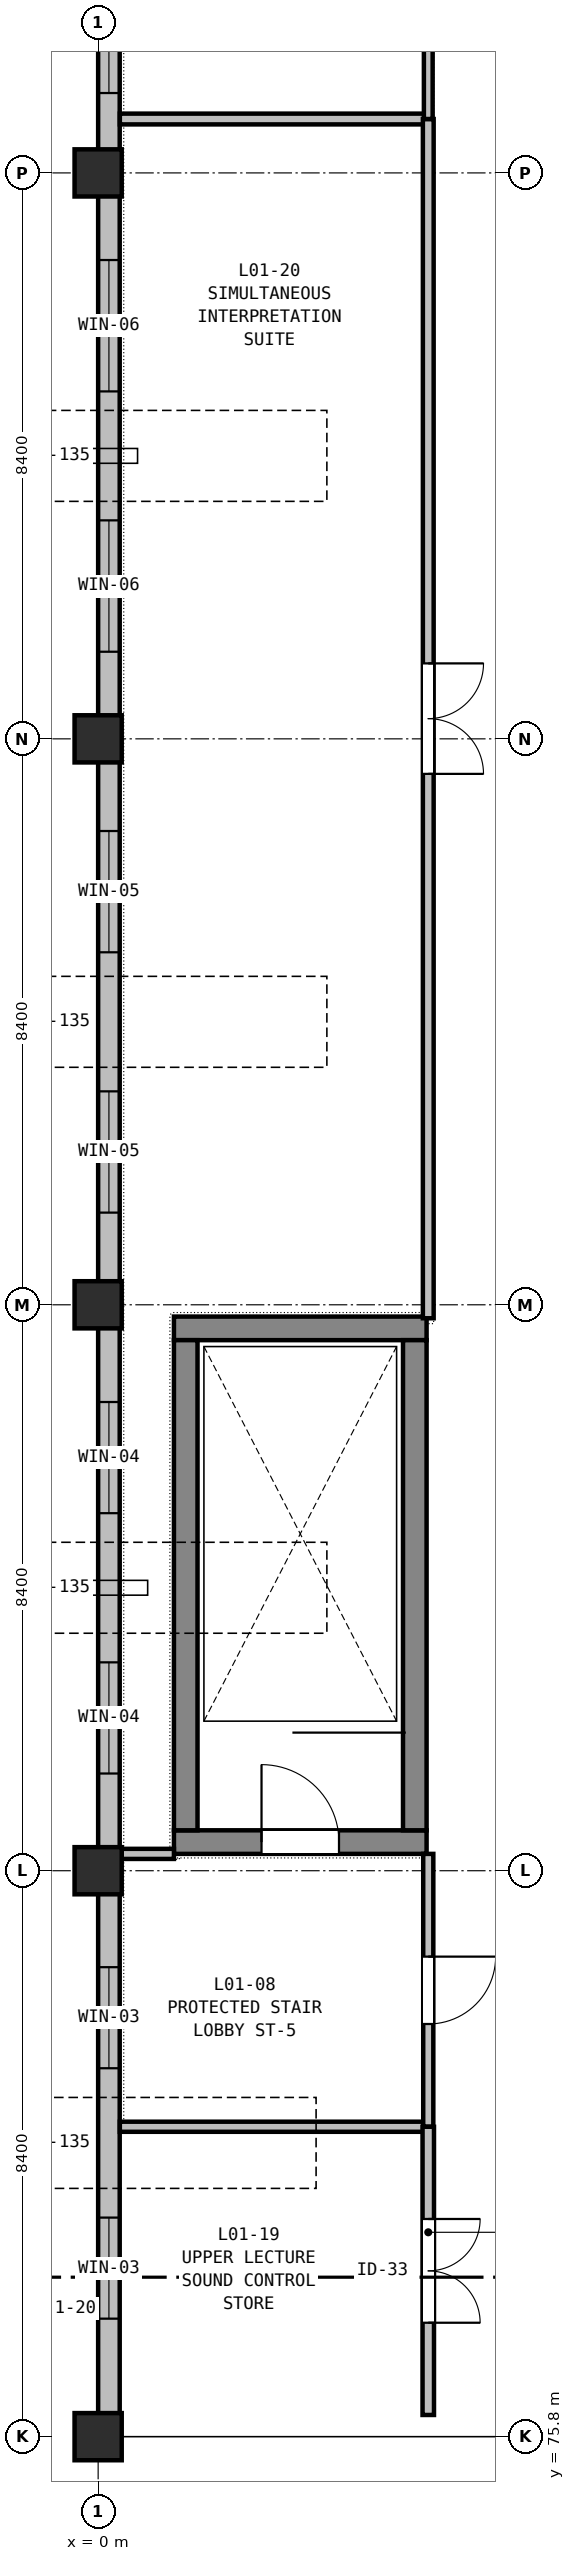
"""IFC4 building model, lengths in metres.
Left out: names, types, materials, properties, quantities, classifications, styles, units other than length and angle.
Written with IfcOpenShell. Run it as: python <this file> out.ifc"""

import sys

from ifc_helpers import new_model, si_unit, direction, frame, frame_2d, origin, origin_2d, place, context, subcontext, project, spatial, rectangle, extrude, element, fill, save


model = new_model("IFC4")
c1 = context("Model", 3, precision=1e-05, world=origin(), true_north=direction((0.0, 1.0)))
c2 = subcontext(c1, "Body", "Model", "MODEL_VIEW")
j1 = project(units=[si_unit("LENGTHUNIT", "METRE"), si_unit("PLANEANGLEUNIT", "RADIAN")], contexts=[c1])
p1 = place(None, origin())
s1 = spatial("IfcSite", under=j1, at=p1, CompositionType="ELEMENT")
p2 = place(p1, origin())
s2 = spatial("IfcBuilding", under=s1, at=p2, CompositionType="ELEMENT")
p3 = place(p2, frame((0.0, 0.0, 5.4)))
s3 = spatial("IfcBuildingStorey", under=s2, at=p3, CompositionType="ELEMENT", Elevation=5.4)
for number, where, z_axis, x_axis in (
    (1, (0.0, 75.8, 0.0), (0.0, 0.0, 1.0), (1.0, 0.0, 0.0)),
    (2, (0.0, 84.2, 0.0), (0.0, 0.0, 1.0), (1.0, 0.0, 0.0)),
    (3, (0.0, 92.6, 0.0), (0.0, 0.0, 1.0), (1.0, 0.0, 0.0)),
    (4, (0.0, 101.0, 0.0), (0.0, 0.0, 1.0), (1.0, 0.0, 0.0)),
    (5, (0.0, 109.4, 0.0), (0.0, 0.0, 1.0), (1.0, 0.0, 0.0)),
):
    element("IfcColumn", number, at=place(p3, frame(where, z_axis=z_axis, x_axis=x_axis)), inside=s3, PredefinedType="COLUMN", context=c2, shape_type="SweptSolid", body=[
        extrude(rectangle(XDim=0.7, YDim=0.7, at=origin_2d()), origin(), (0.0, 0.0, 1.0), 4.74),
    ])
p4 = place(p3, frame((1.125, 84.625, 0.0), z_axis=(0.0, 0.0, 1.0), x_axis=(1.0, 0.0, 0.0)))
e6 = element("IfcWall", 6, at=p4, inside=s3, PredefinedType="SHEAR", context=c2, shape_type="SweptSolid", body=[
    extrude(rectangle(XDim=3.75, YDim=0.35, at=frame_2d((1.875, 0.0))), origin(), (0.0, 0.0, 1.0), 4.74),
])
p5 = place(p4, frame((1.3, 0.0, 0.0)))
e7 = element("IfcOpeningElement", 7, at=p5, cuts=e6, PredefinedType="OPENING", context=c2, shape_type="SweptSolid", body=[
    extrude(rectangle(XDim=1.15, YDim=2.15, at=frame_2d((0.575, 1.075))), frame((0.0, 0.185, 0.0), z_axis=(0.0, -1.0, 0.0), x_axis=(1.0, 0.0, 0.0)), (0.0, 0.0, 1.0), 0.37),
])
p6 = place(p3, frame((1.125, 92.25, 0.0), z_axis=(0.0, 0.0, 1.0), x_axis=(1.0, 0.0, 0.0)))
e8 = element("IfcWall", 8, at=p6, inside=s3, PredefinedType="SHEAR", context=c2, shape_type="SweptSolid", body=[
    extrude(rectangle(XDim=3.75, YDim=0.35, at=frame_2d((1.875, 0.0))), origin(), (0.0, 0.0, 1.0), 4.74),
])
for number, where, z_axis, x_axis in (
    (9, (1.3, 84.8, 0.0), (0.0, 0.0, 1.0), (0.0, 1.0, 0.0)),
    (10, (4.7, 84.8, 0.0), (0.0, 0.0, 1.0), (0.0, 1.0, 0.0)),
):
    element("IfcWall", number, at=place(p3, frame(where, z_axis=z_axis, x_axis=x_axis)), inside=s3, PredefinedType="SHEAR", context=c2, shape_type="SweptSolid", body=[
        extrude(rectangle(XDim=7.275, YDim=0.35, at=frame_2d((3.637, 0.0))), origin(), (0.0, 0.0, 1.0), 4.74),
    ])
p7 = place(p3, frame((0.16, 76.12, 0.0), z_axis=(0.0, 0.0, 1.0), x_axis=(0.0, 1.0, 0.0)))
e11 = element("IfcWall", 11, at=p7, inside=s3, PredefinedType="STANDARD", context=c2, shape_type="SweptSolid", body=[
    extrude(rectangle(XDim=8.08, YDim=0.32, at=frame_2d((4.04, 0.0))), origin(), (0.0, 0.0, 1.0), 4.085),
])
p8 = place(p7, frame((1.432, 0.0, 0.9)))
e12 = element("IfcOpeningElement", 12, at=p8, cuts=e11, PredefinedType="OPENING", context=c2, shape_type="SweptSolid", body=[
    extrude(rectangle(XDim=1.5, YDim=2.1, at=frame_2d((0.75, 1.05))), frame((0.0, 0.17, 0.0), z_axis=(0.0, -1.0, 0.0), x_axis=(1.0, 0.0, 0.0)), (0.0, 0.0, 1.0), 0.34),
])
p9 = place(p7, frame((5.148, 0.0, 0.9)))
e13 = element("IfcOpeningElement", 13, at=p9, cuts=e11, PredefinedType="OPENING", context=c2, shape_type="SweptSolid", body=[
    extrude(rectangle(XDim=1.5, YDim=2.1, at=frame_2d((0.75, 1.05))), frame((0.0, 0.17, 0.0), z_axis=(0.0, -1.0, 0.0), x_axis=(1.0, 0.0, 0.0)), (0.0, 0.0, 1.0), 0.34),
])
p10 = place(p3, frame((0.16, 84.2, 0.0), z_axis=(0.0, 0.0, 1.0), x_axis=(0.0, 1.0, 0.0)))
e14 = element("IfcWall", 14, at=p10, inside=s3, PredefinedType="STANDARD", context=c2, shape_type="SweptSolid", body=[
    extrude(rectangle(XDim=8.4, YDim=0.32, at=frame_2d((4.2, 0.0))), origin(), (0.0, 0.0, 1.0), 4.085),
])
p11 = place(p10, frame((1.443, 0.0, 0.9)))
e15 = element("IfcOpeningElement", 15, at=p11, cuts=e14, PredefinedType="OPENING", context=c2, shape_type="SweptSolid", body=[
    extrude(rectangle(XDim=1.65, YDim=2.1, at=frame_2d((0.825, 1.05))), frame((0.0, 0.17, 0.0), z_axis=(0.0, -1.0, 0.0), x_axis=(1.0, 0.0, 0.0)), (0.0, 0.0, 1.0), 0.34),
])
p12 = place(p10, frame((5.307, 0.0, 0.9)))
e16 = element("IfcOpeningElement", 16, at=p12, cuts=e14, PredefinedType="OPENING", context=c2, shape_type="SweptSolid", body=[
    extrude(rectangle(XDim=1.65, YDim=2.1, at=frame_2d((0.825, 1.05))), frame((0.0, 0.17, 0.0), z_axis=(0.0, -1.0, 0.0), x_axis=(1.0, 0.0, 0.0)), (0.0, 0.0, 1.0), 0.34),
])
p13 = place(p3, frame((0.16, 92.6, 0.0), z_axis=(0.0, 0.0, 1.0), x_axis=(0.0, 1.0, 0.0)))
e17 = element("IfcWall", 17, at=p13, inside=s3, PredefinedType="STANDARD", context=c2, shape_type="SweptSolid", body=[
    extrude(rectangle(XDim=8.4, YDim=0.32, at=frame_2d((4.2, 0.0))), origin(), (0.0, 0.0, 1.0), 4.085),
])
p14 = place(p13, frame((1.368, 0.0, 0.9)))
e18 = element("IfcOpeningElement", 18, at=p14, cuts=e17, PredefinedType="OPENING", context=c2, shape_type="SweptSolid", body=[
    extrude(rectangle(XDim=1.8, YDim=2.1, at=frame_2d((0.9, 1.05))), frame((0.0, 0.17, 0.0), z_axis=(0.0, -1.0, 0.0), x_axis=(1.0, 0.0, 0.0)), (0.0, 0.0, 1.0), 0.34),
])
p15 = place(p13, frame((5.232, 0.0, 0.9)))
e19 = element("IfcOpeningElement", 19, at=p15, cuts=e17, PredefinedType="OPENING", context=c2, shape_type="SweptSolid", body=[
    extrude(rectangle(XDim=1.8, YDim=2.1, at=frame_2d((0.9, 1.05))), frame((0.0, 0.17, 0.0), z_axis=(0.0, -1.0, 0.0), x_axis=(1.0, 0.0, 0.0)), (0.0, 0.0, 1.0), 0.34),
])
p16 = place(p3, frame((0.16, 101.0, 0.0), z_axis=(0.0, 0.0, 1.0), x_axis=(0.0, 1.0, 0.0)))
e20 = element("IfcWall", 20, at=p16, inside=s3, PredefinedType="STANDARD", context=c2, shape_type="SweptSolid", body=[
    extrude(rectangle(XDim=8.4, YDim=0.32, at=frame_2d((4.2, 0.0))), origin(), (0.0, 0.0, 1.0), 4.085),
])
p17 = place(p16, frame((1.293, 0.0, 0.9)))
e21 = element("IfcOpeningElement", 21, at=p17, cuts=e20, PredefinedType="OPENING", context=c2, shape_type="SweptSolid", body=[
    extrude(rectangle(XDim=1.95, YDim=2.1, at=frame_2d((0.975, 1.05))), frame((0.0, 0.17, 0.0), z_axis=(0.0, -1.0, 0.0), x_axis=(1.0, 0.0, 0.0)), (0.0, 0.0, 1.0), 0.34),
])
p18 = place(p16, frame((5.157, 0.0, 0.9)))
e22 = element("IfcOpeningElement", 22, at=p18, cuts=e20, PredefinedType="OPENING", context=c2, shape_type="SweptSolid", body=[
    extrude(rectangle(XDim=1.95, YDim=2.1, at=frame_2d((0.975, 1.05))), frame((0.0, 0.17, 0.0), z_axis=(0.0, -1.0, 0.0), x_axis=(1.0, 0.0, 0.0)), (0.0, 0.0, 1.0), 0.34),
])
p19 = place(p3, frame((0.16, 109.4, 0.0), z_axis=(0.0, 0.0, 1.0), x_axis=(0.0, 1.0, 0.0)))
e23 = element("IfcWall", 23, at=p19, inside=s3, PredefinedType="STANDARD", context=c2, shape_type="SweptSolid", body=[
    extrude(rectangle(XDim=8.28, YDim=0.32, at=frame_2d((4.14, 0.0))), origin(), (0.0, 0.0, 1.0), 4.085),
])
p20 = place(p19, frame((1.186, 0.0, 0.9)))
e24 = element("IfcOpeningElement", 24, at=p20, cuts=e23, PredefinedType="OPENING", context=c2, shape_type="SweptSolid", body=[
    extrude(rectangle(XDim=2.1, YDim=2.1, at=frame_2d((1.05, 1.05))), frame((0.0, 0.17, 0.0), z_axis=(0.0, -1.0, 0.0), x_axis=(1.0, 0.0, 0.0)), (0.0, 0.0, 1.0), 0.34),
])
p21 = place(p19, frame((4.994, 0.0, 0.9)))
e25 = element("IfcOpeningElement", 25, at=p21, cuts=e23, PredefinedType="OPENING", context=c2, shape_type="SweptSolid", body=[
    extrude(rectangle(XDim=2.1, YDim=2.1, at=frame_2d((1.05, 1.05))), frame((0.0, 0.17, 0.0), z_axis=(0.0, -1.0, 0.0), x_axis=(1.0, 0.0, 0.0)), (0.0, 0.0, 1.0), 0.34),
])
p22 = place(p3, frame((6.8, 75.96, 0.0), z_axis=(0.0, 0.0, 1.0), x_axis=(-1.0, 0.0, 0.0)))
e26 = element("IfcWall", 26, at=p22, inside=s3, PredefinedType="STANDARD", context=c2, shape_type="SweptSolid", body=[
    extrude(rectangle(XDim=6.8, YDim=0.32, at=frame_2d((3.4, 0.0))), origin(), (0.0, 0.0, 1.0), 3.835),
])
p23 = place(p22, frame((2.14, 0.0, 0.9)))
e27 = element("IfcOpeningElement", 27, at=p23, cuts=e26, PredefinedType="OPENING", context=c2, shape_type="SweptSolid", body=[
    extrude(rectangle(XDim=1.5, YDim=2.1, at=frame_2d((0.75, 1.05))), frame((0.0, 0.17, 0.0), z_axis=(0.0, -1.0, 0.0), x_axis=(1.0, 0.0, 0.0)), (0.0, 0.0, 1.0), 0.34),
])
p24 = place(p22, frame((4.214, 0.0, 0.9)))
e28 = element("IfcOpeningElement", 28, at=p24, cuts=e26, PredefinedType="OPENING", context=c2, shape_type="SweptSolid", body=[
    extrude(rectangle(XDim=1.5, YDim=2.1, at=frame_2d((0.75, 1.05))), frame((0.0, 0.17, 0.0), z_axis=(0.0, -1.0, 0.0), x_axis=(1.0, 0.0, 0.0)), (0.0, 0.0, 1.0), 0.34),
])
p25 = place(p3, frame((4.9, 80.4, 0.0), z_axis=(0.0, 0.0, 1.0), x_axis=(-1.0, 0.0, 0.0)))
e29 = element("IfcWall", 29, at=p25, inside=s3, PredefinedType="PARTITIONING", context=c2, shape_type="SweptSolid", body=[
    extrude(rectangle(XDim=4.578, YDim=0.15, at=frame_2d((2.289, 0.0))), origin(), (0.0, 0.0, 1.0), 4.085),
])
p26 = place(p3, frame((0.35, 84.45, 0.0), z_axis=(0.0, 0.0, 1.0), x_axis=(1.0, 0.0, 0.0)))
e30 = element("IfcWall", 30, at=p26, inside=s3, PredefinedType="PARTITIONING", context=c2, shape_type="SweptSolid", body=[
    extrude(rectangle(XDim=0.775, YDim=0.15, at=frame_2d((0.387, 0.0))), origin(), (0.0, 0.0, 1.0), 4.135),
])
p27 = place(p3, frame((4.9, 84.45, 0.0), z_axis=(0.0, 0.0, 1.0), x_axis=(0.0, -1.0, 0.0)))
e31 = element("IfcWall", 31, at=p27, inside=s3, PredefinedType="PARTITIONING", context=c2, shape_type="SweptSolid", body=[
    extrude(rectangle(XDim=4.05, YDim=0.15, at=frame_2d((2.025, 0.0))), origin(), (0.0, 0.0, 1.0), 4.135),
])
p28 = place(p27, frame((1.525, 0.0, 0.0)))
e32 = element("IfcOpeningElement", 32, at=p28, cuts=e31, PredefinedType="OPENING", context=c2, shape_type="SweptSolid", body=[
    extrude(rectangle(XDim=1.0, YDim=2.1, at=frame_2d((0.5, 1.05))), frame((0.0, 0.085, 0.0), z_axis=(0.0, -1.0, 0.0), x_axis=(1.0, 0.0, 0.0)), (0.0, 0.0, 1.0), 0.17),
])
p29 = place(p3, frame((4.9, 80.4, 0.0), z_axis=(0.0, 0.0, 1.0), x_axis=(0.0, -1.0, 0.0)))
e33 = element("IfcWall", 33, at=p29, inside=s3, PredefinedType="PARTITIONING", context=c2, shape_type="SweptSolid", body=[
    extrude(rectangle(XDim=4.278, YDim=0.17, at=frame_2d((2.139, 0.0))), origin(), (0.0, 0.0, 1.0), 4.085),
])
p30 = place(p29, frame((1.369, 0.0, 0.0)))
e34 = element("IfcOpeningElement", 34, at=p30, cuts=e33, PredefinedType="OPENING", context=c2, shape_type="SweptSolid", body=[
    extrude(rectangle(XDim=1.54, YDim=2.2, at=frame_2d((0.77, 1.1))), frame((0.0, 0.095, 0.0), z_axis=(0.0, -1.0, 0.0), x_axis=(1.0, 0.0, 0.0)), (0.0, 0.0, 1.0), 0.19),
])
p31 = place(p3, frame((0.322, 110.2, 0.0), z_axis=(0.0, 0.0, 1.0), x_axis=(1.0, 0.0, 0.0)))
e35 = element("IfcWall", 35, at=p31, inside=s3, PredefinedType="PARTITIONING", context=c2, shape_type="SweptSolid", body=[
    extrude(rectangle(XDim=4.578, YDim=0.16, at=frame_2d((2.289, 0.0))), origin(), (0.0, 0.0, 1.0), 4.085),
])
p32 = place(p3, frame((4.9, 110.2, 0.0), z_axis=(0.0, 0.0, 1.0), x_axis=(0.0, -1.0, 0.0)))
e36 = element("IfcWall", 36, at=p32, inside=s3, PredefinedType="PARTITIONING", context=c2, shape_type="SweptSolid", body=[
    extrude(rectangle(XDim=17.8, YDim=0.16, at=frame_2d((8.9, 0.0))), origin(), (0.0, 0.0, 1.0), 4.135),
])
p33 = place(p32, frame((8.08, 0.0, 0.0)))
e37 = element("IfcOpeningElement", 37, at=p33, cuts=e36, PredefinedType="OPENING", context=c2, shape_type="SweptSolid", body=[
    extrude(rectangle(XDim=1.64, YDim=2.2, at=frame_2d((0.82, 1.1))), frame((0.0, 0.09, 0.0), z_axis=(0.0, -1.0, 0.0), x_axis=(1.0, 0.0, 0.0)), (0.0, 0.0, 1.0), 0.18),
])
p34 = place(p3, frame((4.9, 117.678, 0.0), z_axis=(0.0, 0.0, 1.0), x_axis=(0.0, -1.0, 0.0)))
e38 = element("IfcWall", 38, at=p34, inside=s3, PredefinedType="PARTITIONING", context=c2, shape_type="SweptSolid", body=[
    extrude(rectangle(XDim=7.478, YDim=0.13, at=frame_2d((3.739, 0.0))), origin(), (0.0, 0.0, 1.0), 4.085),
])
p35 = place(p34, frame((3.009, 0.0, 0.0)))
e39 = element("IfcOpeningElement", 39, at=p35, cuts=e38, PredefinedType="OPENING", context=c2, shape_type="SweptSolid", body=[
    extrude(rectangle(XDim=1.46, YDim=2.2, at=frame_2d((0.73, 1.1))), frame((0.0, 0.075, 0.0), z_axis=(0.0, -1.0, 0.0), x_axis=(1.0, 0.0, 0.0)), (0.0, 0.0, 1.0), 0.15),
])
p36 = place(p8, origin())
e40 = element("IfcWindow", 40, at=p36, inside=s3, PartitioningType="SINGLE_PANEL", PredefinedType="WINDOW", context=c2, shape_type="SweptSolid", body=[
    extrude(rectangle(XDim=1.5, YDim=2.1, at=frame_2d((0.75, 1.05))), frame((0.0, 0.03, 0.0), z_axis=(0.0, -1.0, 0.0), x_axis=(1.0, 0.0, 0.0)), (0.0, 0.0, 1.0), 0.06),
])
fill(e12, e40)
p37 = place(p9, origin())
e41 = element("IfcWindow", 41, at=p37, inside=s3, PartitioningType="SINGLE_PANEL", PredefinedType="WINDOW", context=c2, shape_type="SweptSolid", body=[
    extrude(rectangle(XDim=1.5, YDim=2.1, at=frame_2d((0.75, 1.05))), frame((0.0, 0.03, 0.0), z_axis=(0.0, -1.0, 0.0), x_axis=(1.0, 0.0, 0.0)), (0.0, 0.0, 1.0), 0.06),
])
fill(e13, e41)
p38 = place(p11, origin())
e42 = element("IfcWindow", 42, at=p38, inside=s3, PartitioningType="SINGLE_PANEL", PredefinedType="WINDOW", context=c2, shape_type="SweptSolid", body=[
    extrude(rectangle(XDim=1.65, YDim=2.1, at=frame_2d((0.825, 1.05))), frame((0.0, 0.03, 0.0), z_axis=(0.0, -1.0, 0.0), x_axis=(1.0, 0.0, 0.0)), (0.0, 0.0, 1.0), 0.06),
])
fill(e15, e42)
p39 = place(p12, origin())
e43 = element("IfcWindow", 43, at=p39, inside=s3, PartitioningType="SINGLE_PANEL", PredefinedType="WINDOW", context=c2, shape_type="SweptSolid", body=[
    extrude(rectangle(XDim=1.65, YDim=2.1, at=frame_2d((0.825, 1.05))), frame((0.0, 0.03, 0.0), z_axis=(0.0, -1.0, 0.0), x_axis=(1.0, 0.0, 0.0)), (0.0, 0.0, 1.0), 0.06),
])
fill(e16, e43)
p40 = place(p14, origin())
e44 = element("IfcWindow", 44, at=p40, inside=s3, PartitioningType="SINGLE_PANEL", PredefinedType="WINDOW", context=c2, shape_type="SweptSolid", body=[
    extrude(rectangle(XDim=1.8, YDim=2.1, at=frame_2d((0.9, 1.05))), frame((0.0, 0.03, 0.0), z_axis=(0.0, -1.0, 0.0), x_axis=(1.0, 0.0, 0.0)), (0.0, 0.0, 1.0), 0.06),
])
fill(e18, e44)
p41 = place(p15, origin())
e45 = element("IfcWindow", 45, at=p41, inside=s3, PartitioningType="SINGLE_PANEL", PredefinedType="WINDOW", context=c2, shape_type="SweptSolid", body=[
    extrude(rectangle(XDim=1.8, YDim=2.1, at=frame_2d((0.9, 1.05))), frame((0.0, 0.03, 0.0), z_axis=(0.0, -1.0, 0.0), x_axis=(1.0, 0.0, 0.0)), (0.0, 0.0, 1.0), 0.06),
])
fill(e19, e45)
p42 = place(p17, origin())
e46 = element("IfcWindow", 46, at=p42, inside=s3, PartitioningType="SINGLE_PANEL", PredefinedType="WINDOW", context=c2, shape_type="SweptSolid", body=[
    extrude(rectangle(XDim=1.95, YDim=2.1, at=frame_2d((0.975, 1.05))), frame((0.0, 0.03, 0.0), z_axis=(0.0, -1.0, 0.0), x_axis=(1.0, 0.0, 0.0)), (0.0, 0.0, 1.0), 0.06),
])
fill(e21, e46)
p43 = place(p18, origin())
e47 = element("IfcWindow", 47, at=p43, inside=s3, PartitioningType="SINGLE_PANEL", PredefinedType="WINDOW", context=c2, shape_type="SweptSolid", body=[
    extrude(rectangle(XDim=1.95, YDim=2.1, at=frame_2d((0.975, 1.05))), frame((0.0, 0.03, 0.0), z_axis=(0.0, -1.0, 0.0), x_axis=(1.0, 0.0, 0.0)), (0.0, 0.0, 1.0), 0.06),
])
fill(e22, e47)
p44 = place(p20, origin())
e48 = element("IfcWindow", 48, at=p44, inside=s3, PartitioningType="SINGLE_PANEL", PredefinedType="WINDOW", context=c2, shape_type="SweptSolid", body=[
    extrude(rectangle(XDim=2.1, YDim=2.1, at=frame_2d((1.05, 1.05))), frame((0.0, 0.03, 0.0), z_axis=(0.0, -1.0, 0.0), x_axis=(1.0, 0.0, 0.0)), (0.0, 0.0, 1.0), 0.06),
])
fill(e24, e48)
p45 = place(p23, origin())
e49 = element("IfcWindow", 49, at=p45, inside=s3, PartitioningType="SINGLE_PANEL", PredefinedType="WINDOW", context=c2, shape_type="SweptSolid", body=[
    extrude(rectangle(XDim=1.5, YDim=2.1, at=frame_2d((0.75, 1.05))), frame((0.0, 0.03, 0.0), z_axis=(0.0, -1.0, 0.0), x_axis=(1.0, 0.0, 0.0)), (0.0, 0.0, 1.0), 0.06),
])
fill(e27, e49)
p46 = place(p24, origin())
e50 = element("IfcWindow", 50, at=p46, inside=s3, PartitioningType="SINGLE_PANEL", PredefinedType="WINDOW", context=c2, shape_type="SweptSolid", body=[
    extrude(rectangle(XDim=1.5, YDim=2.1, at=frame_2d((0.75, 1.05))), frame((0.0, 0.03, 0.0), z_axis=(0.0, -1.0, 0.0), x_axis=(1.0, 0.0, 0.0)), (0.0, 0.0, 1.0), 0.06),
])
fill(e28, e50)
p47 = place(p5, origin())
e51 = element("IfcDoor", 51, at=p47, inside=s3, OperationType="SINGLE_SWING_LEFT", PredefinedType="DOOR", context=c2, shape_type="SweptSolid", body=[
    extrude(rectangle(XDim=1.15, YDim=2.15, at=frame_2d((0.575, 1.075))), frame((0.0, 0.025, 0.0), z_axis=(0.0, -1.0, 0.0), x_axis=(1.0, 0.0, 0.0)), (0.0, 0.0, 1.0), 0.05),
])
fill(e7, e51)
p48 = place(p28, origin())
e52 = element("IfcDoor", 52, at=p48, inside=s3, OperationType="SINGLE_SWING_LEFT", PredefinedType="DOOR", context=c2, shape_type="SweptSolid", body=[
    extrude(rectangle(XDim=1.0, YDim=2.1, at=frame_2d((0.5, 1.05))), frame((0.0, 0.025, 0.0), z_axis=(0.0, -1.0, 0.0), x_axis=(1.0, 0.0, 0.0)), (0.0, 0.0, 1.0), 0.05),
])
fill(e32, e52)
p49 = place(p30, origin())
e53 = element("IfcDoor", 53, at=p49, inside=s3, OperationType="DOUBLE_DOOR_SINGLE_SWING", PredefinedType="DOOR", context=c2, shape_type="SweptSolid", body=[
    extrude(rectangle(XDim=1.54, YDim=2.2, at=frame_2d((0.77, 1.1))), frame((0.0, 0.025, 0.0), z_axis=(0.0, -1.0, 0.0), x_axis=(1.0, 0.0, 0.0)), (0.0, 0.0, 1.0), 0.05),
])
fill(e34, e53)
p50 = place(p33, origin())
e54 = element("IfcDoor", 54, at=p50, inside=s3, OperationType="DOUBLE_DOOR_SINGLE_SWING", PredefinedType="DOOR", context=c2, shape_type="SweptSolid", body=[
    extrude(rectangle(XDim=1.64, YDim=2.2, at=frame_2d((0.82, 1.1))), frame((0.0, 0.025, 0.0), z_axis=(0.0, -1.0, 0.0), x_axis=(1.0, 0.0, 0.0)), (0.0, 0.0, 1.0), 0.05),
])
fill(e37, e54)
save(model, sys.argv[1])
